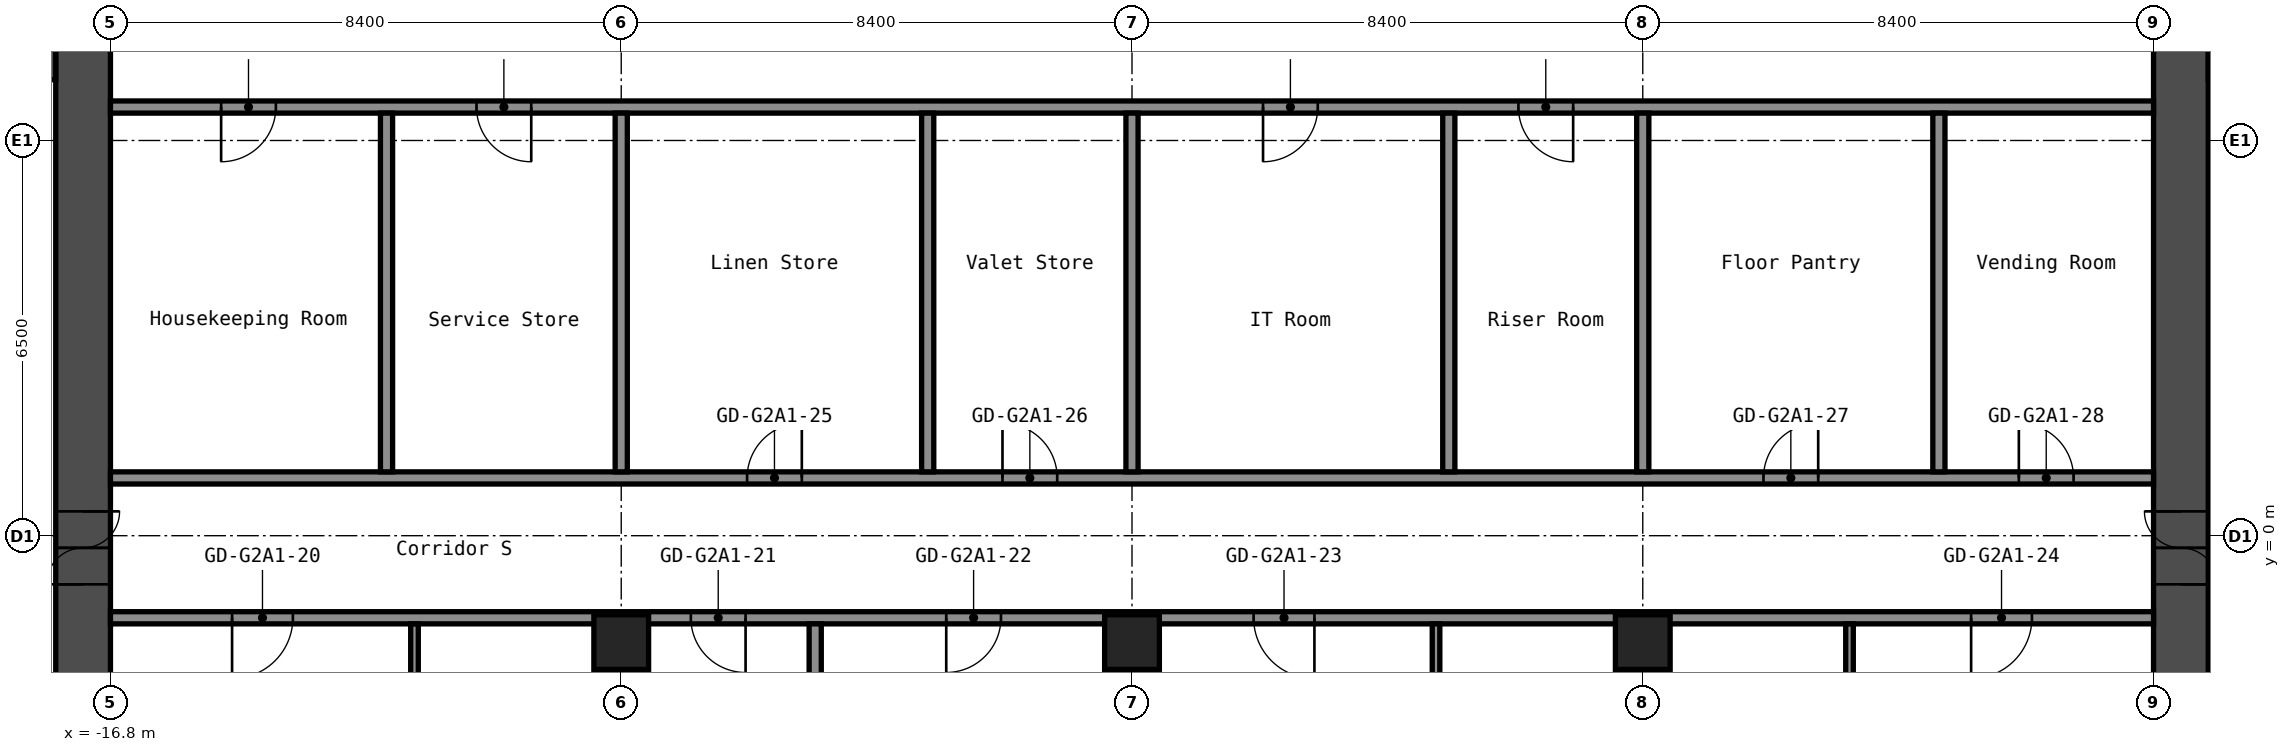
"""IFC4 building model, lengths in metres.
Left out: names, types, materials, properties, quantities, classifications, styles, units other than length and angle.
Written with IfcOpenShell. Run it as: python <this file> out.ifc"""

import sys

from ifc_helpers import new_model, si_unit, direction, frame, frame_2d, origin, origin_2d, place, context, subcontext, project, spatial, rectangle, hollow_rectangle, extrude, element, fill, save


model = new_model("IFC4")
c1 = context("Model", 3, precision=1e-05, world=origin(), true_north=direction((0.0, 1.0)))
c2 = subcontext(c1, "Body", "Model", "MODEL_VIEW")
j1 = project(units=[si_unit("LENGTHUNIT", "METRE"), si_unit("PLANEANGLEUNIT", "RADIAN")], contexts=[c1])
p1 = place(None, origin())
s1 = spatial("IfcSite", under=j1, at=p1, CompositionType="ELEMENT")
p2 = place(p1, origin())
s2 = spatial("IfcBuilding", under=s1, at=p2, CompositionType="ELEMENT")
p3 = place(p2, frame((0.0, 0.0, 91.4)))
s3 = spatial("IfcBuildingStorey", under=s2, at=p3, CompositionType="ELEMENT", Elevation=91.4)
for number, where, z_axis, x_axis in (
    (1, (-8.4, -1.75, 0.0), (0.0, 0.0, 1.0), (1.0, 0.0, 0.0)),
    (2, (0.0, -1.75, 0.0), (0.0, 0.0, 1.0), (1.0, 0.0, 0.0)),
    (3, (8.4, -1.75, 0.0), (0.0, 0.0, 1.0), (1.0, 0.0, 0.0)),
):
    element("IfcColumn", number, at=place(p3, frame(where, z_axis=z_axis, x_axis=x_axis)), inside=s3, PredefinedType="COLUMN", context=c2, shape_type="SweptSolid", body=[
        extrude(hollow_rectangle(XDim=0.9, YDim=0.9, WallThickness=0.036, at=origin_2d()), origin(), (0.0, 0.0, 1.0), 2.8),
    ])
p4 = place(p3, frame((-17.25, -8.4, 0.0), z_axis=(0.0, 0.0, 1.0), x_axis=(0.0, 1.0, 0.0)))
e4 = element("IfcWall", 4, at=p4, inside=s3, PredefinedType="SHEAR", context=c2, shape_type="SweptSolid", body=[
    extrude(rectangle(XDim=16.8, YDim=0.9, at=frame_2d((8.4, 0.0))), origin(), (0.0, 0.0, 1.0), 2.8),
])
p5 = place(p4, frame((7.6, 0.0, 0.0)))
e5 = element("IfcOpeningElement", 5, at=p5, cuts=e4, PredefinedType="OPENING", context=c2, shape_type="SweptSolid", body=[
    extrude(rectangle(XDim=1.2, YDim=2.1, at=frame_2d((0.6, 1.05))), frame((0.0, 0.46, 0.0), z_axis=(0.0, -1.0, 0.0), x_axis=(1.0, 0.0, 0.0)), (0.0, 0.0, 1.0), 0.92),
])
p6 = place(p3, frame((-32.7, 7.95, 0.0), z_axis=(0.0, 0.0, 1.0), x_axis=(1.0, 0.0, 0.0)))
e6 = element("IfcWall", 6, at=p6, inside=s3, PredefinedType="SHEAR", context=c2, shape_type="SweptSolid", body=[
    extrude(rectangle(XDim=15.0, YDim=0.9, at=frame_2d((7.5, 0.0))), origin(), (0.0, 0.0, 1.0), 2.8),
])
p7 = place(p6, frame((3.4, 0.0, 0.0)))
e7 = element("IfcOpeningElement", 7, at=p7, cuts=e6, PredefinedType="OPENING", context=c2, shape_type="SweptSolid", body=[
    extrude(rectangle(XDim=1.2, YDim=2.1, at=frame_2d((0.6, 1.05))), frame((0.0, 0.46, 0.0), z_axis=(0.0, -1.0, 0.0), x_axis=(1.0, 0.0, 0.0)), (0.0, 0.0, 1.0), 0.92),
])
p8 = place(p6, frame((0.75, 0.0, 0.0)))
e8 = element("IfcOpeningElement", 8, at=p8, cuts=e6, PredefinedType="OPENING", context=c2, shape_type="SweptSolid", body=[
    extrude(rectangle(XDim=0.9, YDim=2.1, at=frame_2d((0.45, 1.05))), frame((0.0, 0.46, 0.0), z_axis=(0.0, -1.0, 0.0), x_axis=(1.0, 0.0, 0.0)), (0.0, 0.0, 1.0), 0.92),
])
p9 = place(p3, frame((17.25, -8.4, 0.0), z_axis=(0.0, 0.0, 1.0), x_axis=(0.0, 1.0, 0.0)))
e9 = element("IfcWall", 9, at=p9, inside=s3, PredefinedType="SHEAR", context=c2, shape_type="SweptSolid", body=[
    extrude(rectangle(XDim=16.8, YDim=0.9, at=frame_2d((8.4, 0.0))), origin(), (0.0, 0.0, 1.0), 2.8),
])
p10 = place(p9, frame((7.6, 0.0, 0.0)))
e10 = element("IfcOpeningElement", 10, at=p10, cuts=e9, PredefinedType="OPENING", context=c2, shape_type="SweptSolid", body=[
    extrude(rectangle(XDim=1.2, YDim=2.1, at=frame_2d((0.6, 1.05))), frame((0.0, 0.46, 0.0), z_axis=(0.0, -1.0, 0.0), x_axis=(1.0, 0.0, 0.0)), (0.0, 0.0, 1.0), 0.92),
])
p11 = place(p3, frame((17.7, 7.95, 0.0), z_axis=(0.0, 0.0, 1.0), x_axis=(1.0, 0.0, 0.0)))
e11 = element("IfcWall", 11, at=p11, inside=s3, PredefinedType="SHEAR", context=c2, shape_type="SweptSolid", body=[
    extrude(rectangle(XDim=15.0, YDim=0.9, at=frame_2d((7.5, 0.0))), origin(), (0.0, 0.0, 1.0), 2.8),
])
p12 = place(p11, frame((10.4, 0.0, 0.0)))
e12 = element("IfcOpeningElement", 12, at=p12, cuts=e11, PredefinedType="OPENING", context=c2, shape_type="SweptSolid", body=[
    extrude(rectangle(XDim=1.2, YDim=2.1, at=frame_2d((0.6, 1.05))), frame((0.0, 0.46, 0.0), z_axis=(0.0, -1.0, 0.0), x_axis=(1.0, 0.0, 0.0)), (0.0, 0.0, 1.0), 0.92),
])
p13 = place(p11, frame((13.35, 0.0, 0.0)))
e13 = element("IfcOpeningElement", 13, at=p13, cuts=e11, PredefinedType="OPENING", context=c2, shape_type="SweptSolid", body=[
    extrude(rectangle(XDim=0.9, YDim=2.1, at=frame_2d((0.45, 1.05))), frame((0.0, 0.46, 0.0), z_axis=(0.0, -1.0, 0.0), x_axis=(1.0, 0.0, 0.0)), (0.0, 0.0, 1.0), 0.92),
])
p14 = place(p3, frame((-16.8, -1.35, 0.0), z_axis=(0.0, 0.0, 1.0), x_axis=(1.0, 0.0, 0.0)))
e14 = element("IfcWall", 14, at=p14, inside=s3, PredefinedType="PARTITIONING", context=c2, shape_type="SweptSolid", body=[
    extrude(rectangle(XDim=33.6, YDim=0.2, at=frame_2d((16.8, 0.0))), origin(), (0.0, 0.0, 1.0), 2.8),
])
p15 = place(p14, frame((2.0, 0.0, 0.0)))
e15 = element("IfcOpeningElement", 15, at=p15, cuts=e14, PredefinedType="OPENING", context=c2, shape_type="SweptSolid", body=[
    extrude(rectangle(XDim=1.0, YDim=2.1, at=frame_2d((0.5, 1.05))), frame((0.0, 0.11, 0.0), z_axis=(0.0, -1.0, 0.0), x_axis=(1.0, 0.0, 0.0)), (0.0, 0.0, 1.0), 0.22),
])
p16 = place(p14, frame((9.545, 0.0, 0.0)))
e16 = element("IfcOpeningElement", 16, at=p16, cuts=e14, PredefinedType="OPENING", context=c2, shape_type="SweptSolid", body=[
    extrude(rectangle(XDim=0.9, YDim=2.1, at=frame_2d((0.45, 1.05))), frame((0.0, 0.11, 0.0), z_axis=(0.0, -1.0, 0.0), x_axis=(1.0, 0.0, 0.0)), (0.0, 0.0, 1.0), 0.22),
])
p17 = place(p14, frame((13.745, 0.0, 0.0)))
e17 = element("IfcOpeningElement", 17, at=p17, cuts=e14, PredefinedType="OPENING", context=c2, shape_type="SweptSolid", body=[
    extrude(rectangle(XDim=0.9, YDim=2.1, at=frame_2d((0.45, 1.05))), frame((0.0, 0.11, 0.0), z_axis=(0.0, -1.0, 0.0), x_axis=(1.0, 0.0, 0.0)), (0.0, 0.0, 1.0), 0.22),
])
p18 = place(p14, frame((18.8, 0.0, 0.0)))
e18 = element("IfcOpeningElement", 18, at=p18, cuts=e14, PredefinedType="OPENING", context=c2, shape_type="SweptSolid", body=[
    extrude(rectangle(XDim=1.0, YDim=2.1, at=frame_2d((0.5, 1.05))), frame((0.0, 0.11, 0.0), z_axis=(0.0, -1.0, 0.0), x_axis=(1.0, 0.0, 0.0)), (0.0, 0.0, 1.0), 0.22),
])
p19 = place(p14, frame((30.6, 0.0, 0.0)))
e19 = element("IfcOpeningElement", 19, at=p19, cuts=e14, PredefinedType="OPENING", context=c2, shape_type="SweptSolid", body=[
    extrude(rectangle(XDim=1.0, YDim=2.1, at=frame_2d((0.5, 1.05))), frame((0.0, 0.11, 0.0), z_axis=(0.0, -1.0, 0.0), x_axis=(1.0, 0.0, 0.0)), (0.0, 0.0, 1.0), 0.22),
])
p20 = place(p3, frame((-16.8, 0.95, 0.0), z_axis=(0.0, 0.0, 1.0), x_axis=(1.0, 0.0, 0.0)))
e20 = element("IfcWall", 20, at=p20, inside=s3, PredefinedType="PARTITIONING", context=c2, shape_type="SweptSolid", body=[
    extrude(rectangle(XDim=33.6, YDim=0.2, at=frame_2d((16.8, 0.0))), origin(), (0.0, 0.0, 1.0), 2.8),
])
p21 = place(p20, frame((10.47, 0.0, 0.0)))
e21 = element("IfcOpeningElement", 21, at=p21, cuts=e20, PredefinedType="OPENING", context=c2, shape_type="SweptSolid", body=[
    extrude(rectangle(XDim=0.9, YDim=2.1, at=frame_2d((0.45, 1.05))), frame((0.0, 0.11, 0.0), z_axis=(0.0, -1.0, 0.0), x_axis=(1.0, 0.0, 0.0)), (0.0, 0.0, 1.0), 0.22),
])
p22 = place(p20, frame((14.67, 0.0, 0.0)))
e22 = element("IfcOpeningElement", 22, at=p22, cuts=e20, PredefinedType="OPENING", context=c2, shape_type="SweptSolid", body=[
    extrude(rectangle(XDim=0.9, YDim=2.1, at=frame_2d((0.45, 1.05))), frame((0.0, 0.11, 0.0), z_axis=(0.0, -1.0, 0.0), x_axis=(1.0, 0.0, 0.0)), (0.0, 0.0, 1.0), 0.22),
])
p23 = place(p20, frame((27.185, 0.0, 0.0)))
e23 = element("IfcOpeningElement", 23, at=p23, cuts=e20, PredefinedType="OPENING", context=c2, shape_type="SweptSolid", body=[
    extrude(rectangle(XDim=0.9, YDim=2.1, at=frame_2d((0.45, 1.05))), frame((0.0, 0.11, 0.0), z_axis=(0.0, -1.0, 0.0), x_axis=(1.0, 0.0, 0.0)), (0.0, 0.0, 1.0), 0.22),
])
p24 = place(p20, frame((31.385, 0.0, 0.0)))
e24 = element("IfcOpeningElement", 24, at=p24, cuts=e20, PredefinedType="OPENING", context=c2, shape_type="SweptSolid", body=[
    extrude(rectangle(XDim=0.9, YDim=2.1, at=frame_2d((0.45, 1.05))), frame((0.0, 0.11, 0.0), z_axis=(0.0, -1.0, 0.0), x_axis=(1.0, 0.0, 0.0)), (0.0, 0.0, 1.0), 0.22),
])
p25 = place(p3, frame((-16.8, 7.05, 0.0), z_axis=(0.0, 0.0, 1.0), x_axis=(1.0, 0.0, 0.0)))
e25 = element("IfcWall", 25, at=p25, inside=s3, PredefinedType="PARTITIONING", context=c2, shape_type="SweptSolid", body=[
    extrude(rectangle(XDim=33.6, YDim=0.2, at=frame_2d((16.8, 0.0))), origin(), (0.0, 0.0, 1.0), 2.8),
])
p26 = place(p25, frame((1.82, 0.0, 0.0)))
e26 = element("IfcOpeningElement", 26, at=p26, cuts=e25, PredefinedType="OPENING", context=c2, shape_type="SweptSolid", body=[
    extrude(rectangle(XDim=0.9, YDim=2.1, at=frame_2d((0.45, 1.05))), frame((0.0, 0.11, 0.0), z_axis=(0.0, -1.0, 0.0), x_axis=(1.0, 0.0, 0.0)), (0.0, 0.0, 1.0), 0.22),
])
p27 = place(p25, frame((6.02, 0.0, 0.0)))
e27 = element("IfcOpeningElement", 27, at=p27, cuts=e25, PredefinedType="OPENING", context=c2, shape_type="SweptSolid", body=[
    extrude(rectangle(XDim=0.9, YDim=2.1, at=frame_2d((0.45, 1.05))), frame((0.0, 0.11, 0.0), z_axis=(0.0, -1.0, 0.0), x_axis=(1.0, 0.0, 0.0)), (0.0, 0.0, 1.0), 0.22),
])
p28 = place(p25, frame((18.955, 0.0, 0.0)))
e28 = element("IfcOpeningElement", 28, at=p28, cuts=e25, PredefinedType="OPENING", context=c2, shape_type="SweptSolid", body=[
    extrude(rectangle(XDim=0.9, YDim=2.1, at=frame_2d((0.45, 1.05))), frame((0.0, 0.11, 0.0), z_axis=(0.0, -1.0, 0.0), x_axis=(1.0, 0.0, 0.0)), (0.0, 0.0, 1.0), 0.22),
])
p29 = place(p25, frame((23.155, 0.0, 0.0)))
e29 = element("IfcOpeningElement", 29, at=p29, cuts=e25, PredefinedType="OPENING", context=c2, shape_type="SweptSolid", body=[
    extrude(rectangle(XDim=0.9, YDim=2.1, at=frame_2d((0.45, 1.05))), frame((0.0, 0.11, 0.0), z_axis=(0.0, -1.0, 0.0), x_axis=(1.0, 0.0, 0.0)), (0.0, 0.0, 1.0), 0.22),
])
p30 = place(p3, frame((-12.26, 1.05, 0.0), z_axis=(0.0, 0.0, 1.0), x_axis=(0.0, 1.0, 0.0)))
e30 = element("IfcWall", 30, at=p30, inside=s3, PredefinedType="PARTITIONING", context=c2, shape_type="SweptSolid", body=[
    extrude(rectangle(XDim=5.9, YDim=0.2, at=frame_2d((2.95, 0.0))), origin(), (0.0, 0.0, 1.0), 2.8),
])
p31 = place(p3, frame((-11.8, -4.75, 0.0), z_axis=(0.0, 0.0, 1.0), x_axis=(0.0, 1.0, 0.0)))
e31 = element("IfcWall", 31, at=p31, inside=s3, PredefinedType="PARTITIONING", context=c2, shape_type="SweptSolid", body=[
    extrude(rectangle(XDim=3.3, YDim=0.125, at=frame_2d((1.65, 0.0))), origin(), (0.0, 0.0, 1.0), 2.8),
])
p32 = place(p3, frame((-8.4, -15.55, 0.0), z_axis=(0.0, 0.0, 1.0), x_axis=(0.0, 1.0, 0.0)))
e32 = element("IfcWall", 32, at=p32, inside=s3, PredefinedType="PARTITIONING", context=c2, shape_type="SweptSolid", body=[
    extrude(rectangle(XDim=13.36, YDim=0.2, at=frame_2d((6.68, 0.0))), origin(), (0.0, 0.0, 1.0), 2.8),
])
p33 = place(p3, frame((-8.4, 1.05, 0.0), z_axis=(0.0, 0.0, 1.0), x_axis=(0.0, 1.0, 0.0)))
e33 = element("IfcWall", 33, at=p33, inside=s3, PredefinedType="PARTITIONING", context=c2, shape_type="SweptSolid", body=[
    extrude(rectangle(XDim=5.9, YDim=0.2, at=frame_2d((2.95, 0.0))), origin(), (0.0, 0.0, 1.0), 2.8),
])
p34 = place(p3, frame((-5.21, -15.55, 0.0), z_axis=(0.0, 0.0, 1.0), x_axis=(0.0, 1.0, 0.0)))
e34 = element("IfcWall", 34, at=p34, inside=s3, PredefinedType="PARTITIONING", context=c2, shape_type="SweptSolid", body=[
    extrude(rectangle(XDim=14.1, YDim=0.2, at=frame_2d((7.05, 0.0))), origin(), (0.0, 0.0, 1.0), 2.8),
])
p35 = place(p3, frame((-3.36, 1.05, 0.0), z_axis=(0.0, 0.0, 1.0), x_axis=(0.0, 1.0, 0.0)))
e35 = element("IfcWall", 35, at=p35, inside=s3, PredefinedType="PARTITIONING", context=c2, shape_type="SweptSolid", body=[
    extrude(rectangle(XDim=5.9, YDim=0.2, at=frame_2d((2.95, 0.0))), origin(), (0.0, 0.0, 1.0), 2.8),
])
p36 = place(p3, frame((0.0, -15.55, 0.0), z_axis=(0.0, 0.0, 1.0), x_axis=(0.0, 1.0, 0.0)))
e36 = element("IfcWall", 36, at=p36, inside=s3, PredefinedType="PARTITIONING", context=c2, shape_type="SweptSolid", body=[
    extrude(rectangle(XDim=13.36, YDim=0.2, at=frame_2d((6.68, 0.0))), origin(), (0.0, 0.0, 1.0), 2.8),
])
p37 = place(p3, frame((0.0, 1.05, 0.0), z_axis=(0.0, 0.0, 1.0), x_axis=(0.0, 1.0, 0.0)))
e37 = element("IfcWall", 37, at=p37, inside=s3, PredefinedType="PARTITIONING", context=c2, shape_type="SweptSolid", body=[
    extrude(rectangle(XDim=5.9, YDim=0.2, at=frame_2d((2.95, 0.0))), origin(), (0.0, 0.0, 1.0), 2.8),
])
p38 = place(p3, frame((5.0, -4.75, 0.0), z_axis=(0.0, 0.0, 1.0), x_axis=(0.0, 1.0, 0.0)))
e38 = element("IfcWall", 38, at=p38, inside=s3, PredefinedType="PARTITIONING", context=c2, shape_type="SweptSolid", body=[
    extrude(rectangle(XDim=3.3, YDim=0.125, at=frame_2d((1.65, 0.0))), origin(), (0.0, 0.0, 1.0), 2.8),
])
p39 = place(p3, frame((5.21, 1.05, 0.0), z_axis=(0.0, 0.0, 1.0), x_axis=(0.0, 1.0, 0.0)))
e39 = element("IfcWall", 39, at=p39, inside=s3, PredefinedType="PARTITIONING", context=c2, shape_type="SweptSolid", body=[
    extrude(rectangle(XDim=5.9, YDim=0.2, at=frame_2d((2.95, 0.0))), origin(), (0.0, 0.0, 1.0), 2.8),
])
p40 = place(p3, frame((8.4, -15.55, 0.0), z_axis=(0.0, 0.0, 1.0), x_axis=(0.0, 1.0, 0.0)))
e40 = element("IfcWall", 40, at=p40, inside=s3, PredefinedType="PARTITIONING", context=c2, shape_type="SweptSolid", body=[
    extrude(rectangle(XDim=13.36, YDim=0.2, at=frame_2d((6.68, 0.0))), origin(), (0.0, 0.0, 1.0), 2.8),
])
p41 = place(p3, frame((8.4, 1.05, 0.0), z_axis=(0.0, 0.0, 1.0), x_axis=(0.0, 1.0, 0.0)))
e41 = element("IfcWall", 41, at=p41, inside=s3, PredefinedType="PARTITIONING", context=c2, shape_type="SweptSolid", body=[
    extrude(rectangle(XDim=5.9, YDim=0.2, at=frame_2d((2.95, 0.0))), origin(), (0.0, 0.0, 1.0), 2.8),
])
p42 = place(p3, frame((11.8, -4.75, 0.0), z_axis=(0.0, 0.0, 1.0), x_axis=(0.0, 1.0, 0.0)))
e42 = element("IfcWall", 42, at=p42, inside=s3, PredefinedType="PARTITIONING", context=c2, shape_type="SweptSolid", body=[
    extrude(rectangle(XDim=3.3, YDim=0.125, at=frame_2d((1.65, 0.0))), origin(), (0.0, 0.0, 1.0), 2.8),
])
p43 = place(p3, frame((13.27, 1.05, 0.0), z_axis=(0.0, 0.0, 1.0), x_axis=(0.0, 1.0, 0.0)))
e43 = element("IfcWall", 43, at=p43, inside=s3, PredefinedType="PARTITIONING", context=c2, shape_type="SweptSolid", body=[
    extrude(rectangle(XDim=5.9, YDim=0.2, at=frame_2d((2.95, 0.0))), origin(), (0.0, 0.0, 1.0), 2.8),
])
p44 = place(p5, origin())
e44 = element("IfcDoor", 44, at=p44, inside=s3, OperationType="DOUBLE_DOOR_SINGLE_SWING", PredefinedType="DOOR", context=c2, shape_type="SweptSolid", body=[
    extrude(rectangle(XDim=1.2, YDim=2.1, at=frame_2d((0.6, 1.05))), frame((0.0, 0.025, 0.0), z_axis=(0.0, -1.0, 0.0), x_axis=(1.0, 0.0, 0.0)), (0.0, 0.0, 1.0), 0.05),
])
fill(e5, e44)
p45 = place(p10, origin())
e45 = element("IfcDoor", 45, at=p45, inside=s3, OperationType="DOUBLE_DOOR_SINGLE_SWING", PredefinedType="DOOR", context=c2, shape_type="SweptSolid", body=[
    extrude(rectangle(XDim=1.2, YDim=2.1, at=frame_2d((0.6, 1.05))), frame((0.0, 0.025, 0.0), z_axis=(0.0, -1.0, 0.0), x_axis=(1.0, 0.0, 0.0)), (0.0, 0.0, 1.0), 0.05),
])
fill(e10, e45)
p46 = place(p15, origin())
e46 = element("IfcDoor", 46, at=p46, inside=s3, OperationType="SINGLE_SWING_LEFT", PredefinedType="DOOR", context=c2, shape_type="SweptSolid", body=[
    extrude(rectangle(XDim=1.0, YDim=2.1, at=frame_2d((0.5, 1.05))), frame((0.0, 0.025, 0.0), z_axis=(0.0, -1.0, 0.0), x_axis=(1.0, 0.0, 0.0)), (0.0, 0.0, 1.0), 0.05),
])
fill(e15, e46)
p47 = place(p16, origin())
e47 = element("IfcDoor", 47, at=p47, inside=s3, OperationType="SINGLE_SWING_RIGHT", PredefinedType="DOOR", context=c2, shape_type="SweptSolid", body=[
    extrude(rectangle(XDim=0.9, YDim=2.1, at=frame_2d((0.45, 1.05))), frame((0.0, 0.025, 0.0), z_axis=(0.0, -1.0, 0.0), x_axis=(1.0, 0.0, 0.0)), (0.0, 0.0, 1.0), 0.05),
])
fill(e16, e47)
p48 = place(p17, origin())
e48 = element("IfcDoor", 48, at=p48, inside=s3, OperationType="SINGLE_SWING_LEFT", PredefinedType="DOOR", context=c2, shape_type="SweptSolid", body=[
    extrude(rectangle(XDim=0.9, YDim=2.1, at=frame_2d((0.45, 1.05))), frame((0.0, 0.025, 0.0), z_axis=(0.0, -1.0, 0.0), x_axis=(1.0, 0.0, 0.0)), (0.0, 0.0, 1.0), 0.05),
])
fill(e17, e48)
p49 = place(p18, origin())
e49 = element("IfcDoor", 49, at=p49, inside=s3, OperationType="SINGLE_SWING_RIGHT", PredefinedType="DOOR", context=c2, shape_type="SweptSolid", body=[
    extrude(rectangle(XDim=1.0, YDim=2.1, at=frame_2d((0.5, 1.05))), frame((0.0, 0.025, 0.0), z_axis=(0.0, -1.0, 0.0), x_axis=(1.0, 0.0, 0.0)), (0.0, 0.0, 1.0), 0.05),
])
fill(e18, e49)
p50 = place(p19, origin())
e50 = element("IfcDoor", 50, at=p50, inside=s3, OperationType="SINGLE_SWING_LEFT", PredefinedType="DOOR", context=c2, shape_type="SweptSolid", body=[
    extrude(rectangle(XDim=1.0, YDim=2.1, at=frame_2d((0.5, 1.05))), frame((0.0, 0.025, 0.0), z_axis=(0.0, -1.0, 0.0), x_axis=(1.0, 0.0, 0.0)), (0.0, 0.0, 1.0), 0.05),
])
fill(e19, e50)
p51 = place(p21, origin())
e51 = element("IfcDoor", 51, at=p51, inside=s3, OperationType="SINGLE_SWING_LEFT", PredefinedType="DOOR", context=c2, shape_type="SweptSolid", body=[
    extrude(rectangle(XDim=0.9, YDim=2.1, at=frame_2d((0.45, 1.05))), frame((0.0, 0.025, 0.0), z_axis=(0.0, -1.0, 0.0), x_axis=(1.0, 0.0, 0.0)), (0.0, 0.0, 1.0), 0.05),
])
fill(e21, e51)
p52 = place(p22, origin())
e52 = element("IfcDoor", 52, at=p52, inside=s3, OperationType="SINGLE_SWING_RIGHT", PredefinedType="DOOR", context=c2, shape_type="SweptSolid", body=[
    extrude(rectangle(XDim=0.9, YDim=2.1, at=frame_2d((0.45, 1.05))), frame((0.0, 0.025, 0.0), z_axis=(0.0, -1.0, 0.0), x_axis=(1.0, 0.0, 0.0)), (0.0, 0.0, 1.0), 0.05),
])
fill(e22, e52)
p53 = place(p23, origin())
e53 = element("IfcDoor", 53, at=p53, inside=s3, OperationType="SINGLE_SWING_LEFT", PredefinedType="DOOR", context=c2, shape_type="SweptSolid", body=[
    extrude(rectangle(XDim=0.9, YDim=2.1, at=frame_2d((0.45, 1.05))), frame((0.0, 0.025, 0.0), z_axis=(0.0, -1.0, 0.0), x_axis=(1.0, 0.0, 0.0)), (0.0, 0.0, 1.0), 0.05),
])
fill(e23, e53)
p54 = place(p24, origin())
e54 = element("IfcDoor", 54, at=p54, inside=s3, OperationType="SINGLE_SWING_RIGHT", PredefinedType="DOOR", context=c2, shape_type="SweptSolid", body=[
    extrude(rectangle(XDim=0.9, YDim=2.1, at=frame_2d((0.45, 1.05))), frame((0.0, 0.025, 0.0), z_axis=(0.0, -1.0, 0.0), x_axis=(1.0, 0.0, 0.0)), (0.0, 0.0, 1.0), 0.05),
])
fill(e24, e54)
p55 = place(p26, origin())
e55 = element("IfcDoor", 55, at=p55, inside=s3, OperationType="SINGLE_SWING_LEFT", PredefinedType="DOOR", context=c2, shape_type="SweptSolid", body=[
    extrude(rectangle(XDim=0.9, YDim=2.1, at=frame_2d((0.45, 1.05))), frame((0.0, 0.025, 0.0), z_axis=(0.0, -1.0, 0.0), x_axis=(1.0, 0.0, 0.0)), (0.0, 0.0, 1.0), 0.05),
])
fill(e26, e55)
p56 = place(p27, origin())
e56 = element("IfcDoor", 56, at=p56, inside=s3, OperationType="SINGLE_SWING_RIGHT", PredefinedType="DOOR", context=c2, shape_type="SweptSolid", body=[
    extrude(rectangle(XDim=0.9, YDim=2.1, at=frame_2d((0.45, 1.05))), frame((0.0, 0.025, 0.0), z_axis=(0.0, -1.0, 0.0), x_axis=(1.0, 0.0, 0.0)), (0.0, 0.0, 1.0), 0.05),
])
fill(e27, e56)
p57 = place(p28, origin())
e57 = element("IfcDoor", 57, at=p57, inside=s3, OperationType="SINGLE_SWING_LEFT", PredefinedType="DOOR", context=c2, shape_type="SweptSolid", body=[
    extrude(rectangle(XDim=0.9, YDim=2.1, at=frame_2d((0.45, 1.05))), frame((0.0, 0.025, 0.0), z_axis=(0.0, -1.0, 0.0), x_axis=(1.0, 0.0, 0.0)), (0.0, 0.0, 1.0), 0.05),
])
fill(e28, e57)
p58 = place(p29, origin())
e58 = element("IfcDoor", 58, at=p58, inside=s3, OperationType="SINGLE_SWING_RIGHT", PredefinedType="DOOR", context=c2, shape_type="SweptSolid", body=[
    extrude(rectangle(XDim=0.9, YDim=2.1, at=frame_2d((0.45, 1.05))), frame((0.0, 0.025, 0.0), z_axis=(0.0, -1.0, 0.0), x_axis=(1.0, 0.0, 0.0)), (0.0, 0.0, 1.0), 0.05),
])
fill(e29, e58)
save(model, sys.argv[1])
